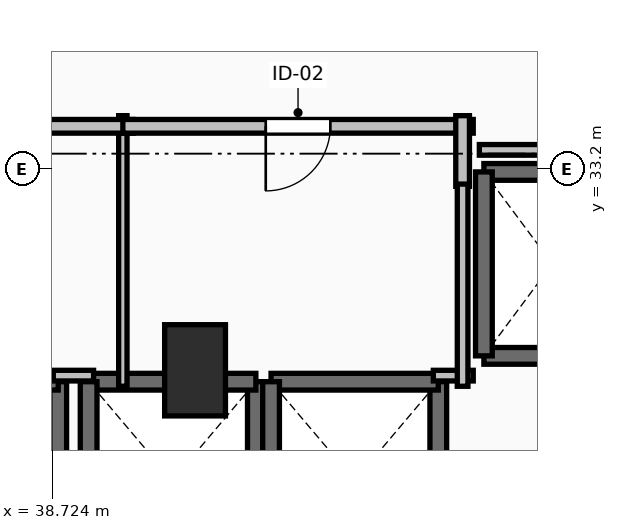
"""IFC4 building model, lengths in metres.
Left out: names, types, materials, properties, quantities, classifications, styles, units other than length and angle.
Written with IfcOpenShell. Run it as: python <this file> out.ifc"""

import sys

from ifc_helpers import new_model, si_unit, direction, frame, frame_2d, origin, origin_2d, place, context, subcontext, project, spatial, rectangle, extrude, element, fill, save


model = new_model("IFC4")
c1 = context("Model", 3, precision=1e-05, world=origin(), true_north=direction((0.0, 1.0)))
c2 = subcontext(c1, "Body", "Model", "MODEL_VIEW")
j1 = project(units=[si_unit("LENGTHUNIT", "METRE"), si_unit("PLANEANGLEUNIT", "RADIAN")], contexts=[c1])
p1 = place(None, origin())
s1 = spatial("IfcSite", under=j1, at=p1, CompositionType="ELEMENT")
p2 = place(p1, origin())
s2 = spatial("IfcBuilding", under=s1, at=p2, CompositionType="ELEMENT")
p3 = place(p2, frame((0.0, 0.0, 106.8)))
s3 = spatial("IfcBuildingStorey", under=s2, at=p3, CompositionType="ELEMENT", Elevation=106.8)
p4 = place(p3, frame((40.6, 30.55, 0.0), z_axis=(0.0, 0.0, 1.0), x_axis=(1.0, 0.0, 0.0)))
e1 = element("IfcColumn", 1, at=p4, inside=s3, PredefinedType="PILASTER", context=c2, shape_type="SweptSolid", body=[
    extrude(rectangle(XDim=0.8, YDim=1.2, at=origin_2d()), origin(), (0.0, 0.0, 1.0), 3.5),
])
p5 = place(p3, frame((38.8, 27.8, 0.0), z_axis=(0.0, 0.0, 1.0), x_axis=(0.0, 1.0, 0.0)))
e2 = element("IfcWall", 2, at=p5, inside=s3, PredefinedType="SOLIDWALL", context=c2, shape_type="SweptSolid", body=[
    extrude(rectangle(XDim=2.6, YDim=0.22, at=frame_2d((1.3, 0.0))), origin(), (0.0, 0.0, 1.0), 3.24),
])
p6 = place(p3, frame((38.8, 30.4, 0.0), z_axis=(0.0, 0.0, 1.0), x_axis=(-1.0, 0.0, 0.0)))
e3 = element("IfcWall", 3, at=p6, inside=s3, PredefinedType="SOLIDWALL", context=c2, shape_type="SweptSolid", body=[
    extrude(rectangle(XDim=2.2, YDim=0.22, at=frame_2d((1.1, 0.0))), origin(), (0.0, 0.0, 1.0), 3.24),
])
p7 = place(p3, frame((41.4, 27.8, 0.0), z_axis=(0.0, 0.0, 1.0), x_axis=(0.0, 1.0, 0.0)))
e4 = element("IfcWall", 4, at=p7, inside=s3, PredefinedType="SOLIDWALL", context=c2, shape_type="SweptSolid", body=[
    extrude(rectangle(XDim=2.6, YDim=0.22, at=frame_2d((1.3, 0.0))), origin(), (0.0, 0.0, 1.0), 3.24),
])
p8 = place(p3, frame((41.4, 30.4, 0.0), z_axis=(0.0, 0.0, 1.0), x_axis=(-1.0, 0.0, 0.0)))
e5 = element("IfcWall", 5, at=p8, inside=s3, PredefinedType="SOLIDWALL", context=c2, shape_type="SweptSolid", body=[
    extrude(rectangle(XDim=2.2, YDim=0.22, at=frame_2d((1.1, 0.0))), origin(), (0.0, 0.0, 1.0), 3.24),
])
for number, where, z_axis, x_axis in (
    (6, (39.2, 30.4, 0.0), (0.0, 0.0, 1.0), (0.0, -1.0, 0.0)),
    (7, (43.8, 27.8, 0.0), (0.0, 0.0, 1.0), (0.0, 1.0, 0.0)),
):
    element("IfcWall", number, at=place(p3, frame(where, z_axis=z_axis, x_axis=x_axis)), inside=s3, PredefinedType="SOLIDWALL", context=c2, shape_type="SweptSolid", body=[
        extrude(rectangle(XDim=2.6, YDim=0.22, at=frame_2d((1.3, 0.0))), origin(), (0.0, 0.0, 1.0), 3.24),
    ])
p9 = place(p3, frame((43.8, 30.4, 0.0), z_axis=(0.0, 0.0, 1.0), x_axis=(-1.0, 0.0, 0.0)))
e8 = element("IfcWall", 8, at=p9, inside=s3, PredefinedType="SOLIDWALL", context=c2, shape_type="SweptSolid", body=[
    extrude(rectangle(XDim=2.2, YDim=0.22, at=frame_2d((1.1, 0.0))), origin(), (0.0, 0.0, 1.0), 3.24),
])
p10 = place(p3, frame((41.6, 30.4, 0.0), z_axis=(0.0, 0.0, 1.0), x_axis=(0.0, -1.0, 0.0)))
e9 = element("IfcWall", 9, at=p10, inside=s3, PredefinedType="SOLIDWALL", context=c2, shape_type="SweptSolid", body=[
    extrude(rectangle(XDim=2.6, YDim=0.22, at=frame_2d((1.3, 0.0))), origin(), (0.0, 0.0, 1.0), 3.24),
])
for number, where, z_axis, x_axis in (
    (10, (44.4, 30.74, 0.0), (0.0, 0.0, 1.0), (1.0, 0.0, 0.0)),
    (11, (46.2, 33.16, 0.0), (0.0, 0.0, 1.0), (-1.0, 0.0, 0.0)),
):
    element("IfcWall", number, at=place(p3, frame(where, z_axis=z_axis, x_axis=x_axis)), inside=s3, PredefinedType="SOLIDWALL", context=c2, shape_type="SweptSolid", body=[
        extrude(rectangle(XDim=1.8, YDim=0.22, at=frame_2d((0.9, 0.0))), origin(), (0.0, 0.0, 1.0), 3.24),
    ])
p11 = place(p3, frame((44.4, 33.16, 0.0), z_axis=(0.0, 0.0, 1.0), x_axis=(0.0, -1.0, 0.0)))
e12 = element("IfcWall", 12, at=p11, inside=s3, PredefinedType="SOLIDWALL", context=c2, shape_type="SweptSolid", body=[
    extrude(rectangle(XDim=2.42, YDim=0.22, at=frame_2d((1.21, 0.0))), origin(), (0.0, 0.0, 1.0), 3.24),
])
p12 = place(p3, frame((39.65, 30.34, 0.0), z_axis=(0.0, 0.0, 1.0), x_axis=(0.0, 1.0, 0.0)))
e13 = element("IfcWall", 13, at=p12, inside=s3, PredefinedType="PARTITIONING", context=c2, shape_type="SweptSolid", body=[
    extrude(rectangle(XDim=3.56, YDim=0.11, at=frame_2d((1.78, 0.0))), origin(), (0.0, 0.0, 1.0), 2.432),
])
p13 = place(p3, frame((39.79, 33.76, 0.0), z_axis=(0.0, 0.0, 1.0), x_axis=(-1.0, 0.0, 0.0)))
e14 = element("IfcWall", 14, at=p13, inside=s3, PredefinedType="PARTITIONING", context=c2, shape_type="SweptSolid", body=[
    extrude(rectangle(XDim=3.63, YDim=0.18, at=frame_2d((1.815, 0.0))), origin(), (0.0, 0.0, 1.0), 3.24),
])
p14 = place(p13, frame((1.39, 0.0, 0.0)))
e15 = element("IfcOpeningElement", 15, at=p14, cuts=e14, PredefinedType="OPENING", context=c2, shape_type="SweptSolid", body=[
    extrude(rectangle(XDim=0.85, YDim=2.1, at=frame_2d((0.425, 1.05))), frame((0.0, 0.105, 0.0), z_axis=(0.0, -1.0, 0.0), x_axis=(1.0, 0.0, 0.0)), (0.0, 0.0, 1.0), 0.21),
])
p15 = place(p3, frame((44.26, 33.76, 0.0), z_axis=(0.0, 0.0, 1.0), x_axis=(-1.0, 0.0, 0.0)))
e16 = element("IfcWall", 16, at=p15, inside=s3, PredefinedType="PARTITIONING", context=c2, shape_type="SweptSolid", body=[
    extrude(rectangle(XDim=4.61, YDim=0.18, at=frame_2d((2.305, 0.0))), origin(), (0.0, 0.0, 1.0), 3.24),
])
p16 = place(p15, frame((1.88, 0.0, 0.0)))
e17 = element("IfcOpeningElement", 17, at=p16, cuts=e16, PredefinedType="OPENING", context=c2, shape_type="SweptSolid", body=[
    extrude(rectangle(XDim=0.85, YDim=2.1, at=frame_2d((0.425, 1.05))), frame((0.0, 0.105, 0.0), z_axis=(0.0, -1.0, 0.0), x_axis=(1.0, 0.0, 0.0)), (0.0, 0.0, 1.0), 0.21),
])
p17 = place(p3, frame((44.12, 32.97, 0.0), z_axis=(0.0, 0.0, 1.0), x_axis=(0.0, 1.0, 0.0)))
e18 = element("IfcWall", 18, at=p17, inside=s3, PredefinedType="PARTITIONING", context=c2, shape_type="SweptSolid", body=[
    extrude(rectangle(XDim=0.93, YDim=0.18, at=frame_2d((0.465, 0.0))), origin(), (0.0, 0.0, 1.0), 3.24),
])
p18 = place(p3, frame((38.735, 30.48, 0.0), z_axis=(0.0, 0.0, 1.0), x_axis=(1.0, 0.0, 0.0)))
e19 = element("IfcWall", 19, at=p18, inside=s3, PredefinedType="PARTITIONING", context=c2, shape_type="SweptSolid", body=[
    extrude(rectangle(XDim=0.53, YDim=0.14, at=frame_2d((0.265, 0.0))), origin(), (0.0, 0.0, 1.0), 2.432),
])
p19 = place(p3, frame((43.735, 30.48, 0.0), z_axis=(0.0, 0.0, 1.0), x_axis=(1.0, 0.0, 0.0)))
e20 = element("IfcWall", 20, at=p19, inside=s3, PredefinedType="PARTITIONING", context=c2, shape_type="SweptSolid", body=[
    extrude(rectangle(XDim=0.525, YDim=0.14, at=frame_2d((0.262, 0.0))), origin(), (0.0, 0.0, 1.0), 3.24),
])
p20 = place(p3, frame((44.12, 30.34, 0.0), z_axis=(0.0, 0.0, 1.0), x_axis=(0.0, 1.0, 0.0)))
e21 = element("IfcWall", 21, at=p20, inside=s3, PredefinedType="PARTITIONING", context=c2, shape_type="SweptSolid", body=[
    extrude(rectangle(XDim=2.66, YDim=0.14, at=frame_2d((1.33, 0.0))), origin(), (0.0, 0.0, 1.0), 3.24),
])
p21 = place(p3, frame((44.34, 33.45, 0.0), z_axis=(0.0, 0.0, 1.0), x_axis=(1.0, 0.0, 0.0)))
e22 = element("IfcWall", 22, at=p21, inside=s3, PredefinedType="PARTITIONING", context=c2, shape_type="SweptSolid", body=[
    extrude(rectangle(XDim=4.21, YDim=0.14, at=frame_2d((2.105, 0.0))), origin(), (0.0, 0.0, 1.0), 2.432),
])
p22 = place(p16, origin())
e23 = element("IfcDoor", 23, at=p22, inside=s3, OperationType="SINGLE_SWING_RIGHT", PredefinedType="DOOR", context=c2, shape_type="SweptSolid", body=[
    extrude(rectangle(XDim=0.85, YDim=2.1, at=frame_2d((0.425, 1.05))), frame((0.0, 0.025, 0.0), z_axis=(0.0, -1.0, 0.0), x_axis=(1.0, 0.0, 0.0)), (0.0, 0.0, 1.0), 0.05),
])
fill(e17, e23)
save(model, sys.argv[1])
